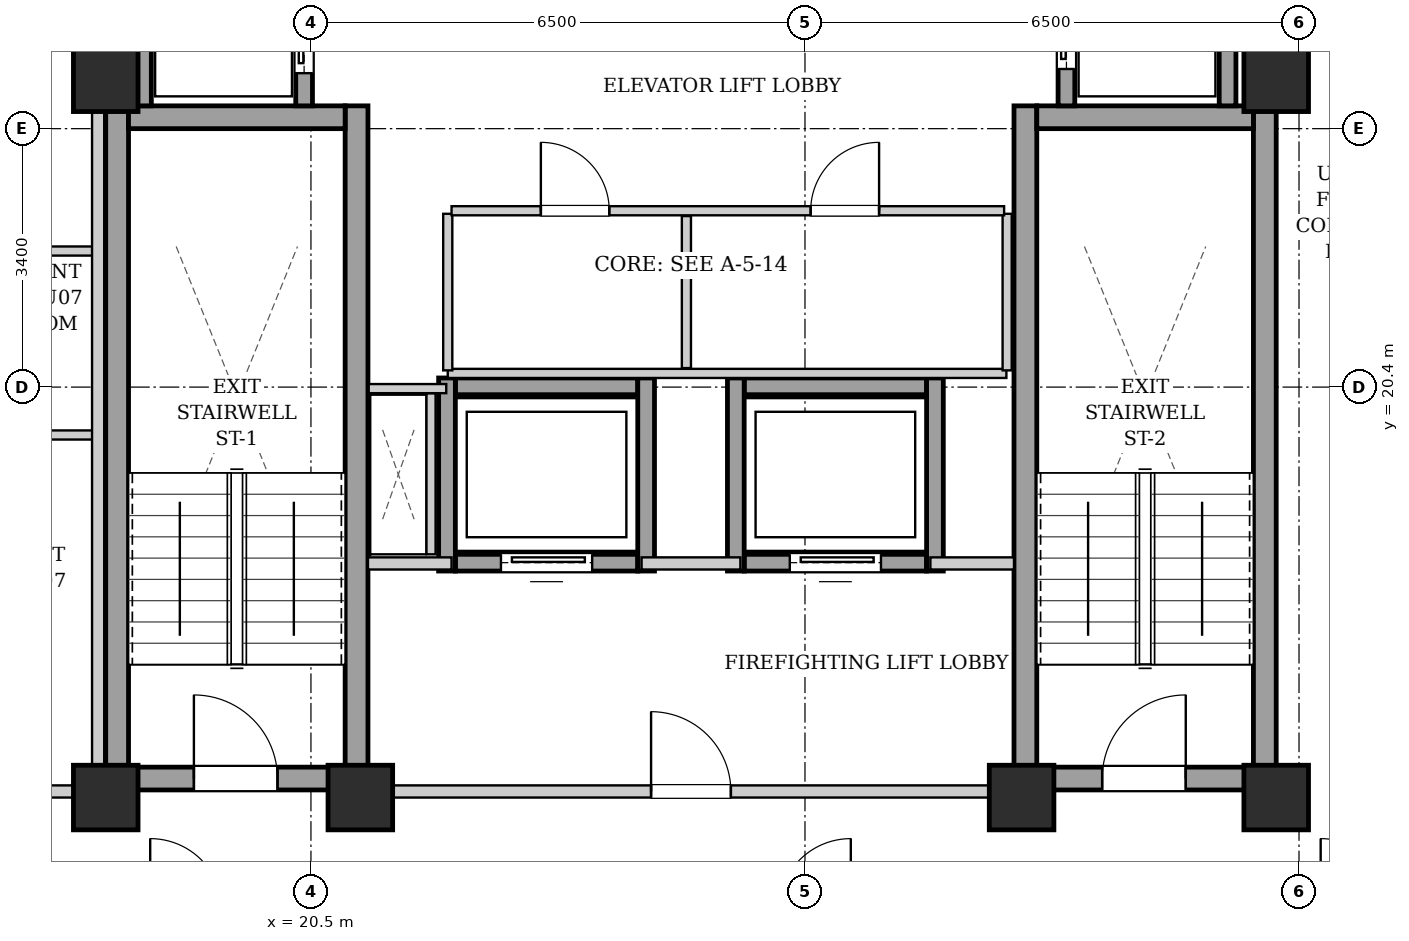
"""IFC4 building model, lengths in metres.
Left out: names, types, materials, properties, quantities, classifications, styles, units other than length and angle.
Written with IfcOpenShell. Run it as: python <this file> out.ifc"""

import sys

from ifc_helpers import new_model, si_unit, direction, frame, frame_2d, origin, origin_2d, place, context, subcontext, project, spatial, rectangle, extrude, element, fill, save


model = new_model("IFC4")
c1 = context("Model", 3, precision=1e-05, world=origin(), true_north=direction((0.0, 1.0)))
c2 = subcontext(c1, "Body", "Model", "MODEL_VIEW")
j1 = project(units=[si_unit("LENGTHUNIT", "METRE"), si_unit("PLANEANGLEUNIT", "RADIAN")], contexts=[c1])
p1 = place(None, origin())
s1 = spatial("IfcSite", under=j1, at=p1, CompositionType="ELEMENT")
p2 = place(p1, origin())
s2 = spatial("IfcBuilding", under=s1, at=p2, CompositionType="ELEMENT")
p3 = place(p2, frame((0.0, 0.0, 214.0)))
s3 = spatial("IfcBuildingStorey", under=s2, at=p3, CompositionType="ELEMENT", Elevation=214.0)
for number, where, z_axis, x_axis in (
    (1, (17.8, 15.0, 0.0), (0.0, 0.0, 1.0), (1.0, 0.0, 0.0)),
    (2, (21.15, 15.0, 0.0), (0.0, 0.0, 1.0), (1.0, 0.0, 0.0)),
    (3, (29.85, 15.0, 0.0), (0.0, 0.0, 1.0), (1.0, 0.0, 0.0)),
    (4, (33.2, 15.0, 0.0), (0.0, 0.0, 1.0), (1.0, 0.0, 0.0)),
    (5, (17.8, 24.45, 0.0), (0.0, 0.0, 1.0), (1.0, 0.0, 0.0)),
    (6, (33.2, 24.45, 0.0), (0.0, 0.0, 1.0), (1.0, 0.0, 0.0)),
):
    element("IfcColumn", number, at=place(p3, frame(where, z_axis=z_axis, x_axis=x_axis)), inside=s3, PredefinedType="COLUMN", context=c2, shape_type="SweptSolid", body=[
        extrude(rectangle(XDim=0.85, YDim=0.85, at=origin_2d()), origin(), (0.0, 0.0, 1.0), 3.3),
    ])
for number, where, z_axis, x_axis in (
    (7, (17.95, 15.1, 0.0), (0.0, 0.0, 1.0), (0.0, 1.0, 0.0)),
    (8, (21.1, 15.1, 0.0), (0.0, 0.0, 1.0), (0.0, 1.0, 0.0)),
):
    element("IfcWall", number, at=place(p3, frame(where, z_axis=z_axis, x_axis=x_axis)), inside=s3, PredefinedType="SHEAR", context=c2, shape_type="SweptSolid", body=[
        extrude(rectangle(XDim=9.0, YDim=0.3, at=frame_2d((4.5, 0.0))), origin(), (0.0, 0.0, 1.0), 3.04),
    ])
p4 = place(p3, frame((18.1, 23.95, 0.0), z_axis=(0.0, 0.0, 1.0), x_axis=(1.0, 0.0, 0.0)))
e9 = element("IfcWall", 9, at=p4, inside=s3, PredefinedType="SHEAR", context=c2, shape_type="SweptSolid", body=[
    extrude(rectangle(XDim=2.85, YDim=0.3, at=frame_2d((1.425, 0.0))), origin(), (0.0, 0.0, 1.0), 3.04),
])
p5 = place(p3, frame((18.1, 15.25, 0.0), z_axis=(0.0, 0.0, 1.0), x_axis=(1.0, 0.0, 0.0)))
e10 = element("IfcWall", 10, at=p5, inside=s3, PredefinedType="SHEAR", context=c2, shape_type="SweptSolid", body=[
    extrude(rectangle(XDim=2.85, YDim=0.3, at=frame_2d((1.425, 0.0))), origin(), (0.0, 0.0, 1.0), 3.04),
])
p6 = place(p5, frame((0.86, 0.0, 0.0)))
e11 = element("IfcOpeningElement", 11, at=p6, cuts=e10, PredefinedType="OPENING", context=c2, shape_type="SweptSolid", body=[
    extrude(rectangle(XDim=1.1, YDim=2.05, at=frame_2d((0.55, 1.025))), frame((0.0, 0.16, 0.0), z_axis=(0.0, -1.0, 0.0), x_axis=(1.0, 0.0, 0.0)), (0.0, 0.0, 1.0), 0.32),
])
for number, where, z_axis, x_axis in (
    (12, (29.9, 15.1, 0.0), (0.0, 0.0, 1.0), (0.0, 1.0, 0.0)),
    (13, (33.05, 15.1, 0.0), (0.0, 0.0, 1.0), (0.0, 1.0, 0.0)),
):
    element("IfcWall", number, at=place(p3, frame(where, z_axis=z_axis, x_axis=x_axis)), inside=s3, PredefinedType="SHEAR", context=c2, shape_type="SweptSolid", body=[
        extrude(rectangle(XDim=9.0, YDim=0.3, at=frame_2d((4.5, 0.0))), origin(), (0.0, 0.0, 1.0), 3.04),
    ])
p7 = place(p3, frame((30.05, 23.95, 0.0), z_axis=(0.0, 0.0, 1.0), x_axis=(1.0, 0.0, 0.0)))
e14 = element("IfcWall", 14, at=p7, inside=s3, PredefinedType="SHEAR", context=c2, shape_type="SweptSolid", body=[
    extrude(rectangle(XDim=2.85, YDim=0.3, at=frame_2d((1.425, 0.0))), origin(), (0.0, 0.0, 1.0), 3.04),
])
p8 = place(p3, frame((30.05, 15.25, 0.0), z_axis=(0.0, 0.0, 1.0), x_axis=(1.0, 0.0, 0.0)))
e15 = element("IfcWall", 15, at=p8, inside=s3, PredefinedType="SHEAR", context=c2, shape_type="SweptSolid", body=[
    extrude(rectangle(XDim=2.85, YDim=0.3, at=frame_2d((1.425, 0.0))), origin(), (0.0, 0.0, 1.0), 3.04),
])
p9 = place(p8, frame((0.86, 0.0, 0.0)))
e16 = element("IfcOpeningElement", 16, at=p9, cuts=e15, PredefinedType="OPENING", context=c2, shape_type="SweptSolid", body=[
    extrude(rectangle(XDim=1.1, YDim=2.05, at=frame_2d((0.55, 1.025))), frame((0.0, 0.16, 0.0), z_axis=(0.0, -1.0, 0.0), x_axis=(1.0, 0.0, 0.0)), (0.0, 0.0, 1.0), 0.32),
])
p10 = place(p3, frame((18.29, 24.1, 0.0), z_axis=(0.0, 0.0, 1.0), x_axis=(0.0, 1.0, 0.0)))
e17 = element("IfcWall", 17, at=p10, inside=s3, PredefinedType="SHEAR", context=c2, shape_type="SweptSolid", body=[
    extrude(rectangle(XDim=4.14, YDim=0.22, at=frame_2d((2.07, 0.0))), origin(), (0.0, 0.0, 1.0), 3.04),
])
p11 = place(p3, frame((20.41, 24.1, 0.0), z_axis=(0.0, 0.0, 1.0), x_axis=(0.0, 1.0, 0.0)))
e18 = element("IfcWall", 18, at=p11, inside=s3, PredefinedType="SHEAR", context=c2, shape_type="SweptSolid", body=[
    extrude(rectangle(XDim=1.96, YDim=0.22, at=frame_2d((0.98, 0.0))), origin(), (0.0, 0.0, 1.0), 3.04),
])
p12 = place(p11, frame((0.43, 0.0, 0.0)))
e19 = element("IfcOpeningElement", 19, at=p12, cuts=e18, PredefinedType="OPENING", context=c2, shape_type="SweptSolid", body=[
    extrude(rectangle(XDim=1.1, YDim=2.15, at=frame_2d((0.55, 1.075))), frame((0.0, 0.12, 0.0), z_axis=(0.0, -1.0, 0.0), x_axis=(1.0, 0.0, 0.0)), (0.0, 0.0, 1.0), 0.24),
])
p13 = place(p3, frame((30.44, 24.1, 0.0), z_axis=(0.0, 0.0, 1.0), x_axis=(0.0, 1.0, 0.0)))
e20 = element("IfcWall", 20, at=p13, inside=s3, PredefinedType="SHEAR", context=c2, shape_type="SweptSolid", body=[
    extrude(rectangle(XDim=2.07, YDim=0.22, at=frame_2d((1.035, 0.0))), origin(), (0.0, 0.0, 1.0), 3.04),
])
p14 = place(p13, frame((0.485, 0.0, 0.0)))
e21 = element("IfcOpeningElement", 21, at=p14, cuts=e20, PredefinedType="OPENING", context=c2, shape_type="SweptSolid", body=[
    extrude(rectangle(XDim=1.1, YDim=2.15, at=frame_2d((0.55, 1.075))), frame((0.0, 0.12, 0.0), z_axis=(0.0, -1.0, 0.0), x_axis=(1.0, 0.0, 0.0)), (0.0, 0.0, 1.0), 0.24),
])
p15 = place(p3, frame((32.56, 24.1, 0.0), z_axis=(0.0, 0.0, 1.0), x_axis=(0.0, 1.0, 0.0)))
e22 = element("IfcWall", 22, at=p15, inside=s3, PredefinedType="SHEAR", context=c2, shape_type="SweptSolid", body=[
    extrude(rectangle(XDim=2.07, YDim=0.22, at=frame_2d((1.035, 0.0))), origin(), (0.0, 0.0, 1.0), 3.04),
])
p16 = place(p3, frame((22.4, 18.09, 0.0), z_axis=(0.0, 0.0, 1.0), x_axis=(1.0, 0.0, 0.0)))
e23 = element("IfcWall", 23, at=p16, inside=s3, PredefinedType="SHEAR", context=c2, shape_type="SweptSolid", body=[
    extrude(rectangle(XDim=2.4, YDim=0.22, at=frame_2d((1.2, 0.0))), origin(), (0.0, 0.0, 1.0), 3.04),
])
p17 = place(p16, frame((0.6, 0.0, 0.0)))
e24 = element("IfcOpeningElement", 24, at=p17, cuts=e23, PredefinedType="OPENING", context=c2, shape_type="SweptSolid", body=[
    extrude(rectangle(XDim=1.2, YDim=2.15, at=frame_2d((0.6, 1.075))), frame((0.0, 0.12, 0.0), z_axis=(0.0, -1.0, 0.0), x_axis=(1.0, 0.0, 0.0)), (0.0, 0.0, 1.0), 0.24),
])
p18 = place(p3, frame((22.4, 20.41, 0.0), z_axis=(0.0, 0.0, 1.0), x_axis=(1.0, 0.0, 0.0)))
e25 = element("IfcWall", 25, at=p18, inside=s3, PredefinedType="SHEAR", context=c2, shape_type="SweptSolid", body=[
    extrude(rectangle(XDim=2.4, YDim=0.22, at=frame_2d((1.2, 0.0))), origin(), (0.0, 0.0, 1.0), 3.04),
])
for number, where, z_axis, x_axis in (
    (26, (22.29, 17.98, 0.0), (0.0, 0.0, 1.0), (0.0, 1.0, 0.0)),
    (27, (24.91, 17.98, 0.0), (0.0, 0.0, 1.0), (0.0, 1.0, 0.0)),
):
    element("IfcWall", number, at=place(p3, frame(where, z_axis=z_axis, x_axis=x_axis)), inside=s3, PredefinedType="SHEAR", context=c2, shape_type="SweptSolid", body=[
        extrude(rectangle(XDim=2.54, YDim=0.22, at=frame_2d((1.27, 0.0))), origin(), (0.0, 0.0, 1.0), 3.04),
    ])
p19 = place(p3, frame((26.2, 18.09, 0.0), z_axis=(0.0, 0.0, 1.0), x_axis=(1.0, 0.0, 0.0)))
e28 = element("IfcWall", 28, at=p19, inside=s3, PredefinedType="SHEAR", context=c2, shape_type="SweptSolid", body=[
    extrude(rectangle(XDim=2.4, YDim=0.22, at=frame_2d((1.2, 0.0))), origin(), (0.0, 0.0, 1.0), 3.04),
])
p20 = place(p19, frame((0.6, 0.0, 0.0)))
e29 = element("IfcOpeningElement", 29, at=p20, cuts=e28, PredefinedType="OPENING", context=c2, shape_type="SweptSolid", body=[
    extrude(rectangle(XDim=1.2, YDim=2.15, at=frame_2d((0.6, 1.075))), frame((0.0, 0.12, 0.0), z_axis=(0.0, -1.0, 0.0), x_axis=(1.0, 0.0, 0.0)), (0.0, 0.0, 1.0), 0.24),
])
p21 = place(p3, frame((26.2, 20.41, 0.0), z_axis=(0.0, 0.0, 1.0), x_axis=(1.0, 0.0, 0.0)))
e30 = element("IfcWall", 30, at=p21, inside=s3, PredefinedType="SHEAR", context=c2, shape_type="SweptSolid", body=[
    extrude(rectangle(XDim=2.4, YDim=0.22, at=frame_2d((1.2, 0.0))), origin(), (0.0, 0.0, 1.0), 3.04),
])
for number, where, z_axis, x_axis in (
    (31, (26.09, 17.98, 0.0), (0.0, 0.0, 1.0), (0.0, 1.0, 0.0)),
    (32, (28.71, 17.98, 0.0), (0.0, 0.0, 1.0), (0.0, 1.0, 0.0)),
):
    element("IfcWall", number, at=place(p3, frame(where, z_axis=z_axis, x_axis=x_axis)), inside=s3, PredefinedType="SHEAR", context=c2, shape_type="SweptSolid", body=[
        extrude(rectangle(XDim=2.54, YDim=0.22, at=frame_2d((1.27, 0.0))), origin(), (0.0, 0.0, 1.0), 3.04),
    ])
p22 = place(p3, frame((21.25, 15.08, 0.0), z_axis=(0.0, 0.0, 1.0), x_axis=(1.0, 0.0, 0.0)))
e33 = element("IfcWall", 33, at=p22, inside=s3, PredefinedType="PARTITIONING", context=c2, shape_type="SweptSolid", body=[
    extrude(rectangle(XDim=8.5, YDim=0.16, at=frame_2d((4.25, 0.0))), origin(), (0.0, 0.0, 1.0), 2.556),
])
p23 = place(p22, frame((3.725, 0.0, 0.0)))
e34 = element("IfcOpeningElement", 34, at=p23, cuts=e33, PredefinedType="OPENING", context=c2, shape_type="SweptSolid", body=[
    extrude(rectangle(XDim=1.05, YDim=2.05, at=frame_2d((0.525, 1.025))), frame((0.0, 0.09, 0.0), z_axis=(0.0, -1.0, 0.0), x_axis=(1.0, 0.0, 0.0)), (0.0, 0.0, 1.0), 0.18),
])
p24 = place(p3, frame((21.25, 18.08, 0.0), z_axis=(0.0, 0.0, 1.0), x_axis=(1.0, 0.0, 0.0)))
e35 = element("IfcWall", 35, at=p24, inside=s3, PredefinedType="PARTITIONING", context=c2, shape_type="SweptSolid", body=[
    extrude(rectangle(XDim=1.1, YDim=0.16, at=frame_2d((0.55, 0.0))), origin(), (0.0, 0.0, 1.0), 3.04),
])
p25 = place(p3, frame((24.85, 18.08, 0.0), z_axis=(0.0, 0.0, 1.0), x_axis=(1.0, 0.0, 0.0)))
e36 = element("IfcWall", 36, at=p25, inside=s3, PredefinedType="PARTITIONING", context=c2, shape_type="SweptSolid", body=[
    extrude(rectangle(XDim=1.3, YDim=0.16, at=frame_2d((0.65, 0.0))), origin(), (0.0, 0.0, 1.0), 3.04),
])
p26 = place(p3, frame((28.65, 18.08, 0.0), z_axis=(0.0, 0.0, 1.0), x_axis=(1.0, 0.0, 0.0)))
e37 = element("IfcWall", 37, at=p26, inside=s3, PredefinedType="PARTITIONING", context=c2, shape_type="SweptSolid", body=[
    extrude(rectangle(XDim=1.1, YDim=0.16, at=frame_2d((0.55, 0.0))), origin(), (0.0, 0.0, 1.0), 3.04),
])
for number, where, z_axis, x_axis in (
    (38, (17.88, 24.12, 0.0), (0.0, 0.0, 1.0), (0.0, 1.0, 0.0)),
    (39, (33.12, 24.12, 0.0), (0.0, 0.0, 1.0), (0.0, 1.0, 0.0)),
):
    element("IfcWall", number, at=place(p3, frame(where, z_axis=z_axis, x_axis=x_axis)), inside=s3, PredefinedType="PARTITIONING", context=c2, shape_type="SweptSolid", body=[
        extrude(rectangle(XDim=4.76, YDim=0.16, at=frame_2d((2.38, 0.0))), origin(), (0.0, 0.0, 1.0), 3.04),
    ])
p27 = place(p3, frame((22.08, 18.2, 0.0), z_axis=(0.0, 0.0, 1.0), x_axis=(0.0, 1.0, 0.0)))
e40 = element("IfcWall", 40, at=p27, inside=s3, PredefinedType="PARTITIONING", context=c2, shape_type="SweptSolid", body=[
    extrude(rectangle(XDim=2.12, YDim=0.12, at=frame_2d((1.06, 0.0))), origin(), (0.0, 0.0, 1.0), 3.04),
])
p28 = place(p3, frame((22.28, 20.38, 0.0), z_axis=(0.0, 0.0, 1.0), x_axis=(-1.0, 0.0, 0.0)))
e41 = element("IfcWall", 41, at=p28, inside=s3, PredefinedType="PARTITIONING", context=c2, shape_type="SweptSolid", body=[
    extrude(rectangle(XDim=1.02, YDim=0.12, at=frame_2d((0.51, 0.0))), origin(), (0.0, 0.0, 1.0), 3.04),
])
p29 = place(p3, frame((22.3, 20.58, 0.0), z_axis=(0.0, 0.0, 1.0), x_axis=(1.0, 0.0, 0.0)))
e42 = element("IfcWall", 42, at=p29, inside=s3, PredefinedType="PARTITIONING", context=c2, shape_type="SweptSolid", body=[
    extrude(rectangle(XDim=7.35, YDim=0.12, at=frame_2d((3.675, 0.0))), origin(), (0.0, 0.0, 1.0), 3.04),
])
for number, where, z_axis, x_axis in (
    (43, (22.3, 20.62, 0.0), (0.0, 0.0, 1.0), (0.0, 1.0, 0.0)),
    (44, (29.66, 20.62, 0.0), (0.0, 0.0, 1.0), (0.0, 1.0, 0.0)),
):
    element("IfcWall", number, at=place(p3, frame(where, z_axis=z_axis, x_axis=x_axis)), inside=s3, PredefinedType="PARTITIONING", context=c2, shape_type="SweptSolid", body=[
        extrude(rectangle(XDim=2.06, YDim=0.12, at=frame_2d((1.03, 0.0))), origin(), (0.0, 0.0, 1.0), 3.04),
    ])
p30 = place(p3, frame((25.44, 20.65, 0.0), z_axis=(0.0, 0.0, 1.0), x_axis=(0.0, 1.0, 0.0)))
e45 = element("IfcWall", 45, at=p30, inside=s3, PredefinedType="PARTITIONING", context=c2, shape_type="SweptSolid", body=[
    extrude(rectangle(XDim=2.0, YDim=0.12, at=frame_2d((1.0, 0.0))), origin(), (0.0, 0.0, 1.0), 3.04),
])
p31 = place(p3, frame((22.35, 22.72, 0.0), z_axis=(0.0, 0.0, 1.0), x_axis=(1.0, 0.0, 0.0)))
e46 = element("IfcWall", 46, at=p31, inside=s3, PredefinedType="PARTITIONING", context=c2, shape_type="SweptSolid", body=[
    extrude(rectangle(XDim=7.27, YDim=0.12, at=frame_2d((3.635, 0.0))), origin(), (0.0, 0.0, 1.0), 3.04),
])
p32 = place(p31, frame((1.175, 0.0, 0.0)))
e47 = element("IfcOpeningElement", 47, at=p32, cuts=e46, PredefinedType="OPENING", context=c2, shape_type="SweptSolid", body=[
    extrude(rectangle(XDim=0.9, YDim=2.05, at=frame_2d((0.45, 1.025))), frame((0.0, 0.07, 0.0), z_axis=(0.0, -1.0, 0.0), x_axis=(1.0, 0.0, 0.0)), (0.0, 0.0, 1.0), 0.14),
])
p33 = place(p31, frame((4.725, 0.0, 0.0)))
e48 = element("IfcOpeningElement", 48, at=p33, cuts=e46, PredefinedType="OPENING", context=c2, shape_type="SweptSolid", body=[
    extrude(rectangle(XDim=0.9, YDim=2.05, at=frame_2d((0.45, 1.025))), frame((0.0, 0.07, 0.0), z_axis=(0.0, -1.0, 0.0), x_axis=(1.0, 0.0, 0.0)), (0.0, 0.0, 1.0), 0.14),
])
p34 = place(p3, frame((10.88, 15.08, 0.0), z_axis=(0.0, 0.0, 1.0), x_axis=(1.0, 0.0, 0.0)))
e49 = element("IfcWall", 49, at=p34, inside=s3, PredefinedType="PARTITIONING", context=c2, shape_type="SweptSolid", body=[
    extrude(rectangle(XDim=6.88, YDim=0.16, at=frame_2d((3.44, 0.0))), origin(), (0.0, 0.0, 1.0), 2.556),
])
p35 = place(p34, frame((5.06, 0.0, 0.0)))
e50 = element("IfcOpeningElement", 50, at=p35, cuts=e49, PredefinedType="OPENING", context=c2, shape_type="SweptSolid", body=[
    extrude(rectangle(XDim=0.95, YDim=2.1, at=frame_2d((0.475, 1.05))), frame((0.0, 0.09, 0.0), z_axis=(0.0, -1.0, 0.0), x_axis=(1.0, 0.0, 0.0)), (0.0, 0.0, 1.0), 0.18),
])
p36 = place(p3, frame((15.19, 22.19, 0.0), z_axis=(0.0, 0.0, 1.0), x_axis=(1.0, 0.0, 0.0)))
e51 = element("IfcWall", 51, at=p36, inside=s3, PredefinedType="PARTITIONING", context=c2, shape_type="SweptSolid", body=[
    extrude(rectangle(XDim=2.45, YDim=0.12, at=frame_2d((1.225, 0.0))), origin(), (0.0, 0.0, 1.0), 3.04),
])
p37 = place(p3, frame((15.19, 19.77, 0.0), z_axis=(0.0, 0.0, 1.0), x_axis=(1.0, 0.0, 0.0)))
e52 = element("IfcWall", 52, at=p37, inside=s3, PredefinedType="PARTITIONING", context=c2, shape_type="SweptSolid", body=[
    extrude(rectangle(XDim=2.45, YDim=0.12, at=frame_2d((1.225, 0.0))), origin(), (0.0, 0.0, 1.0), 3.04),
])
p38 = place(p37, frame((0.795, 0.0, 0.0)))
e53 = element("IfcOpeningElement", 53, at=p38, cuts=e52, PredefinedType="OPENING", context=c2, shape_type="SweptSolid", body=[
    extrude(rectangle(XDim=0.86, YDim=2.05, at=frame_2d((0.43, 1.025))), frame((0.0, 0.07, 0.0), z_axis=(0.0, -1.0, 0.0), x_axis=(1.0, 0.0, 0.0)), (0.0, 0.0, 1.0), 0.14),
])
p39 = place(p3, frame((17.7, 15.02, 0.0), z_axis=(0.0, 0.0, 1.0), x_axis=(0.0, 1.0, 0.0)))
e54 = element("IfcWall", 54, at=p39, inside=s3, PredefinedType="PARTITIONING", context=c2, shape_type="SweptSolid", body=[
    extrude(rectangle(XDim=13.98, YDim=0.16, at=frame_2d((6.99, 0.0))), origin(), (0.0, 0.0, 1.0), 3.04),
])
p40 = place(p6, origin())
e55 = element("IfcDoor", 55, at=p40, inside=s3, OperationType="SINGLE_SWING_LEFT", PredefinedType="DOOR", context=c2, shape_type="SweptSolid", body=[
    extrude(rectangle(XDim=1.1, YDim=2.05, at=frame_2d((0.55, 1.025))), frame((0.0, 0.025, 0.0), z_axis=(0.0, -1.0, 0.0), x_axis=(1.0, 0.0, 0.0)), (0.0, 0.0, 1.0), 0.05),
])
fill(e11, e55)
p41 = place(p9, origin())
e56 = element("IfcDoor", 56, at=p41, inside=s3, OperationType="SINGLE_SWING_RIGHT", PredefinedType="DOOR", context=c2, shape_type="SweptSolid", body=[
    extrude(rectangle(XDim=1.1, YDim=2.05, at=frame_2d((0.55, 1.025))), frame((0.0, 0.025, 0.0), z_axis=(0.0, -1.0, 0.0), x_axis=(1.0, 0.0, 0.0)), (0.0, 0.0, 1.0), 0.05),
])
fill(e16, e56)
p42 = place(p12, origin())
e57 = element("IfcDoor", 57, at=p42, inside=s3, OperationType="SLIDING_TO_LEFT", PredefinedType="DOOR", context=c2, shape_type="SweptSolid", body=[
    extrude(rectangle(XDim=1.1, YDim=2.15, at=frame_2d((0.55, 1.075))), frame((0.0, 0.025, 0.0), z_axis=(0.0, -1.0, 0.0), x_axis=(1.0, 0.0, 0.0)), (0.0, 0.0, 1.0), 0.05),
])
fill(e19, e57)
p43 = place(p14, origin())
e58 = element("IfcDoor", 58, at=p43, inside=s3, OperationType="SLIDING_TO_LEFT", PredefinedType="DOOR", context=c2, shape_type="SweptSolid", body=[
    extrude(rectangle(XDim=1.1, YDim=2.15, at=frame_2d((0.55, 1.075))), frame((0.0, 0.025, 0.0), z_axis=(0.0, -1.0, 0.0), x_axis=(1.0, 0.0, 0.0)), (0.0, 0.0, 1.0), 0.05),
])
fill(e21, e58)
p44 = place(p17, origin())
e59 = element("IfcDoor", 59, at=p44, inside=s3, OperationType="SLIDING_TO_LEFT", PredefinedType="DOOR", context=c2, shape_type="SweptSolid", body=[
    extrude(rectangle(XDim=1.2, YDim=2.15, at=frame_2d((0.6, 1.075))), frame((0.0, 0.025, 0.0), z_axis=(0.0, -1.0, 0.0), x_axis=(1.0, 0.0, 0.0)), (0.0, 0.0, 1.0), 0.05),
])
fill(e24, e59)
p45 = place(p20, origin())
e60 = element("IfcDoor", 60, at=p45, inside=s3, OperationType="SLIDING_TO_LEFT", PredefinedType="DOOR", context=c2, shape_type="SweptSolid", body=[
    extrude(rectangle(XDim=1.2, YDim=2.15, at=frame_2d((0.6, 1.075))), frame((0.0, 0.025, 0.0), z_axis=(0.0, -1.0, 0.0), x_axis=(1.0, 0.0, 0.0)), (0.0, 0.0, 1.0), 0.05),
])
fill(e29, e60)
p46 = place(p23, origin())
e61 = element("IfcDoor", 61, at=p46, inside=s3, OperationType="SINGLE_SWING_LEFT", PredefinedType="DOOR", context=c2, shape_type="SweptSolid", body=[
    extrude(rectangle(XDim=1.05, YDim=2.05, at=frame_2d((0.525, 1.025))), frame((0.0, 0.025, 0.0), z_axis=(0.0, -1.0, 0.0), x_axis=(1.0, 0.0, 0.0)), (0.0, 0.0, 1.0), 0.05),
])
fill(e34, e61)
p47 = place(p32, origin())
e62 = element("IfcDoor", 62, at=p47, inside=s3, OperationType="SINGLE_SWING_LEFT", PredefinedType="DOOR", context=c2, shape_type="SweptSolid", body=[
    extrude(rectangle(XDim=0.9, YDim=2.05, at=frame_2d((0.45, 1.025))), frame((0.0, 0.025, 0.0), z_axis=(0.0, -1.0, 0.0), x_axis=(1.0, 0.0, 0.0)), (0.0, 0.0, 1.0), 0.05),
])
fill(e47, e62)
p48 = place(p33, origin())
e63 = element("IfcDoor", 63, at=p48, inside=s3, OperationType="SINGLE_SWING_RIGHT", PredefinedType="DOOR", context=c2, shape_type="SweptSolid", body=[
    extrude(rectangle(XDim=0.9, YDim=2.05, at=frame_2d((0.45, 1.025))), frame((0.0, 0.025, 0.0), z_axis=(0.0, -1.0, 0.0), x_axis=(1.0, 0.0, 0.0)), (0.0, 0.0, 1.0), 0.05),
])
fill(e48, e63)
save(model, sys.argv[1])
